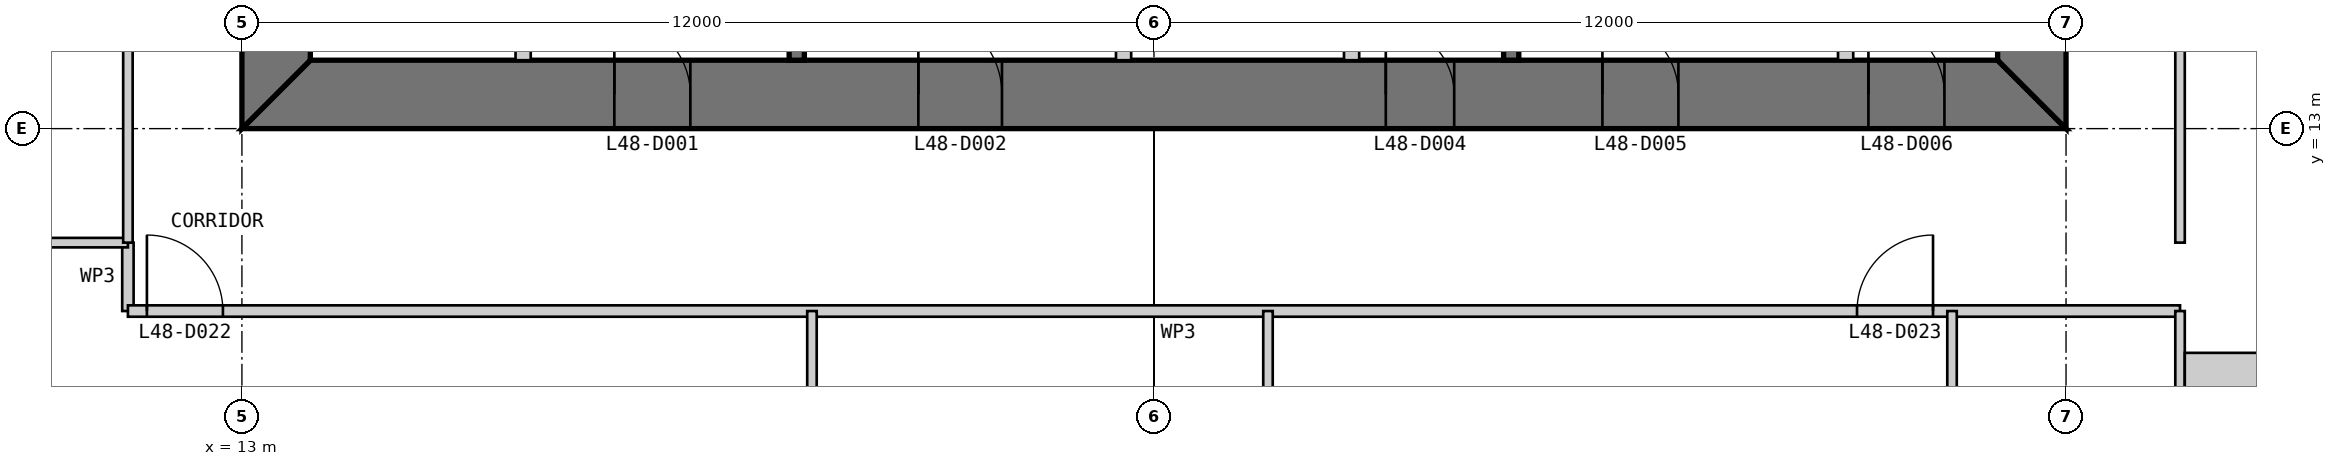
"""IFC4 building model, lengths in metres.
Left out: names, types, materials, properties, quantities, classifications, styles, units other than length and angle.
Written with IfcOpenShell. Run it as: python <this file> out.ifc"""

import sys

from ifc_helpers import new_model, si_unit, direction, frame, frame_2d, origin, place, context, subcontext, project, spatial, polyline, rectangle, outline, extrude, element, fill, save


model = new_model("IFC4")
c1 = context("Model", 3, precision=1e-05, world=origin(), true_north=direction((0.0, 1.0)))
c2 = subcontext(c1, "Body", "Model", "MODEL_VIEW")
j1 = project(units=[si_unit("LENGTHUNIT", "METRE"), si_unit("PLANEANGLEUNIT", "RADIAN")], contexts=[c1])
p1 = place(None, origin())
s1 = spatial("IfcSite", under=j1, at=p1, CompositionType="ELEMENT")
p2 = place(p1, origin())
s2 = spatial("IfcBuilding", under=s1, at=p2, CompositionType="ELEMENT")
p3 = place(p2, frame((0.0, 0.0, 205.8)))
s3 = spatial("IfcBuildingStorey", under=s2, at=p3, CompositionType="ELEMENT", Elevation=205.8)
p4 = place(p3, frame((13.0, 13.45, 0.0), z_axis=(0.0, 0.0, 1.0), x_axis=(1.0, 0.0, 0.0)))
e1 = element("IfcWall", 1, at=p4, inside=s3, PredefinedType="SHEAR", context=c2, shape_type="SweptSolid", body=[
    extrude(outline(polyline([(0.0, -0.45), (24.0, -0.45), (23.1, 0.45), (0.9, 0.45), (0.0, -0.45)])), origin(), (0.0, 0.0, 1.0), 4.0),
])
p5 = place(p4, frame((4.9, 0.0, 0.0)))
e2 = element("IfcOpeningElement", 2, at=p5, cuts=e1, PredefinedType="OPENING", context=c2, shape_type="SweptSolid", body=[
    extrude(rectangle(XDim=1.0, YDim=2.2, at=frame_2d((0.5, 1.1))), frame((0.0, 0.46, 0.0), z_axis=(0.0, -1.0, 0.0), x_axis=(1.0, 0.0, 0.0)), (0.0, 0.0, 1.0), 0.92),
])
p6 = place(p4, frame((8.9, 0.0, 0.0)))
e3 = element("IfcOpeningElement", 3, at=p6, cuts=e1, PredefinedType="OPENING", context=c2, shape_type="SweptSolid", body=[
    extrude(rectangle(XDim=1.1, YDim=2.2, at=frame_2d((0.55, 1.1))), frame((0.0, 0.46, 0.0), z_axis=(0.0, -1.0, 0.0), x_axis=(1.0, 0.0, 0.0)), (0.0, 0.0, 1.0), 0.92),
])
p7 = place(p4, frame((15.05, 0.0, 0.0)))
e4 = element("IfcOpeningElement", 4, at=p7, cuts=e1, PredefinedType="OPENING", context=c2, shape_type="SweptSolid", body=[
    extrude(rectangle(XDim=0.9, YDim=2.2, at=frame_2d((0.45, 1.1))), frame((0.0, 0.46, 0.0), z_axis=(0.0, -1.0, 0.0), x_axis=(1.0, 0.0, 0.0)), (0.0, 0.0, 1.0), 0.92),
])
p8 = place(p4, frame((17.9, 0.0, 0.0)))
e5 = element("IfcOpeningElement", 5, at=p8, cuts=e1, PredefinedType="OPENING", context=c2, shape_type="SweptSolid", body=[
    extrude(rectangle(XDim=1.0, YDim=2.2, at=frame_2d((0.5, 1.1))), frame((0.0, 0.46, 0.0), z_axis=(0.0, -1.0, 0.0), x_axis=(1.0, 0.0, 0.0)), (0.0, 0.0, 1.0), 0.92),
])
p9 = place(p4, frame((21.4, 0.0, 0.0)))
e6 = element("IfcOpeningElement", 6, at=p9, cuts=e1, PredefinedType="OPENING", context=c2, shape_type="SweptSolid", body=[
    extrude(rectangle(XDim=1.0, YDim=2.2, at=frame_2d((0.5, 1.1))), frame((0.0, 0.46, 0.0), z_axis=(0.0, -1.0, 0.0), x_axis=(1.0, 0.0, 0.0)), (0.0, 0.0, 1.0), 0.92),
])
p10 = place(p3, frame((36.55, 13.9, 0.0), z_axis=(0.0, 0.0, 1.0), x_axis=(0.0, 1.0, 0.0)))
e7 = element("IfcWall", 7, at=p10, inside=s3, PredefinedType="SHEAR", context=c2, shape_type="SweptSolid", body=[
    extrude(outline(polyline([(-0.9, -0.45), (23.1, -0.45), (22.2, 0.45), (0.0, 0.45), (-0.9, -0.45)])), origin(), (0.0, 0.0, 1.0), 4.0),
])
p11 = place(p10, frame((20.2, 0.0, 0.0)))
e8 = element("IfcOpeningElement", 8, at=p11, cuts=e7, PredefinedType="OPENING", context=c2, shape_type="SweptSolid", body=[
    extrude(rectangle(XDim=1.0, YDim=2.2, at=frame_2d((0.5, 1.1))), frame((0.0, 0.46, 0.0), z_axis=(0.0, -1.0, 0.0), x_axis=(1.0, 0.0, 0.0)), (0.0, 0.0, 1.0), 0.92),
])
p12 = place(p10, frame((17.25, 0.0, 0.0)))
e9 = element("IfcOpeningElement", 9, at=p12, cuts=e7, PredefinedType="OPENING", context=c2, shape_type="SweptSolid", body=[
    extrude(rectangle(XDim=0.9, YDim=2.2, at=frame_2d((0.45, 1.1))), frame((0.0, 0.46, 0.0), z_axis=(0.0, -1.0, 0.0), x_axis=(1.0, 0.0, 0.0)), (0.0, 0.0, 1.0), 0.92),
])
p13 = place(p3, frame((13.45, 36.1, 0.0), z_axis=(0.0, 0.0, 1.0), x_axis=(0.0, -1.0, 0.0)))
e10 = element("IfcWall", 10, at=p13, inside=s3, PredefinedType="SHEAR", context=c2, shape_type="SweptSolid", body=[
    extrude(outline(polyline([(-0.9, -0.45), (23.1, -0.45), (22.2, 0.45), (0.0, 0.45), (-0.9, -0.45)])), origin(), (0.0, 0.0, 1.0), 4.0),
])
p14 = place(p13, frame((20.2, 0.0, 0.0)))
e11 = element("IfcOpeningElement", 11, at=p14, cuts=e10, PredefinedType="OPENING", context=c2, shape_type="SweptSolid", body=[
    extrude(rectangle(XDim=1.0, YDim=2.2, at=frame_2d((0.5, 1.1))), frame((0.0, 0.46, 0.0), z_axis=(0.0, -1.0, 0.0), x_axis=(1.0, 0.0, 0.0)), (0.0, 0.0, 1.0), 0.92),
])
p15 = place(p13, frame((17.25, 0.0, 0.0)))
e12 = element("IfcOpeningElement", 12, at=p15, cuts=e10, PredefinedType="OPENING", context=c2, shape_type="SweptSolid", body=[
    extrude(rectangle(XDim=0.9, YDim=2.2, at=frame_2d((0.45, 1.1))), frame((0.0, 0.46, 0.0), z_axis=(0.0, -1.0, 0.0), x_axis=(1.0, 0.0, 0.0)), (0.0, 0.0, 1.0), 0.92),
])
p16 = place(p3, frame((16.7, 13.9, 0.0), z_axis=(0.0, 0.0, 1.0), x_axis=(0.0, 1.0, 0.0)))
e13 = element("IfcWall", 13, at=p16, inside=s3, PredefinedType="PARTITIONING", context=c2, shape_type="SweptSolid", body=[
    extrude(rectangle(XDim=16.1, YDim=0.2, at=frame_2d((8.05, 0.0))), origin(), (0.0, 0.0, 1.0), 3.8),
])
p17 = place(p16, frame((7.4, 0.0, 0.0)))
e14 = element("IfcOpeningElement", 14, at=p17, cuts=e13, PredefinedType="OPENING", context=c2, shape_type="SweptSolid", body=[
    extrude(rectangle(XDim=0.9, YDim=2.2, at=frame_2d((0.45, 1.1))), frame((0.0, 0.11, 0.0), z_axis=(0.0, -1.0, 0.0), x_axis=(1.0, 0.0, 0.0)), (0.0, 0.0, 1.0), 0.22),
])
p18 = place(p16, frame((12.4, 0.0, 0.0)))
e15 = element("IfcOpeningElement", 15, at=p18, cuts=e13, PredefinedType="OPENING", context=c2, shape_type="SweptSolid", body=[
    extrude(rectangle(XDim=0.9, YDim=2.2, at=frame_2d((0.45, 1.1))), frame((0.0, 0.11, 0.0), z_axis=(0.0, -1.0, 0.0), x_axis=(1.0, 0.0, 0.0)), (0.0, 0.0, 1.0), 0.22),
])
p19 = place(p3, frame((20.3, 13.9, 0.0), z_axis=(0.0, 0.0, 1.0), x_axis=(0.0, 1.0, 0.0)))
e16 = element("IfcWall", 16, at=p19, inside=s3, PredefinedType="SOLIDWALL", context=c2, shape_type="SweptSolid", body=[
    extrude(rectangle(XDim=16.1, YDim=0.2, at=frame_2d((8.05, 0.0))), origin(), (0.0, 0.0, 1.0), 3.8),
])
p20 = place(p19, frame((7.9, 0.0, 0.0)))
e17 = element("IfcOpeningElement", 17, at=p20, cuts=e16, PredefinedType="OPENING", context=c2, shape_type="SweptSolid", body=[
    extrude(rectangle(XDim=0.9, YDim=2.2, at=frame_2d((0.45, 1.1))), frame((0.0, 0.11, 0.0), z_axis=(0.0, -1.0, 0.0), x_axis=(1.0, 0.0, 0.0)), (0.0, 0.0, 1.0), 0.22),
])
p21 = place(p19, frame((12.9, 0.0, 0.0)))
e18 = element("IfcOpeningElement", 18, at=p21, cuts=e16, PredefinedType="OPENING", context=c2, shape_type="SweptSolid", body=[
    extrude(rectangle(XDim=0.9, YDim=2.2, at=frame_2d((0.45, 1.1))), frame((0.0, 0.11, 0.0), z_axis=(0.0, -1.0, 0.0), x_axis=(1.0, 0.0, 0.0)), (0.0, 0.0, 1.0), 0.22),
])
p22 = place(p3, frame((24.6, 13.9, 0.0), z_axis=(0.0, 0.0, 1.0), x_axis=(0.0, 1.0, 0.0)))
e19 = element("IfcWall", 19, at=p22, inside=s3, PredefinedType="PARTITIONING", context=c2, shape_type="SweptSolid", body=[
    extrude(rectangle(XDim=3.3, YDim=0.2, at=frame_2d((1.65, 0.0))), origin(), (0.0, 0.0, 1.0), 3.8),
])
p23 = place(p22, frame((0.9, 0.0, 0.0)))
e20 = element("IfcOpeningElement", 20, at=p23, cuts=e19, PredefinedType="OPENING", context=c2, shape_type="SweptSolid", body=[
    extrude(rectangle(XDim=1.1, YDim=2.2, at=frame_2d((0.55, 1.1))), frame((0.0, 0.11, 0.0), z_axis=(0.0, -1.0, 0.0), x_axis=(1.0, 0.0, 0.0)), (0.0, 0.0, 1.0), 0.22),
])
p24 = place(p3, frame((27.6, 13.9, 0.0), z_axis=(0.0, 0.0, 1.0), x_axis=(0.0, 1.0, 0.0)))
e21 = element("IfcWall", 21, at=p24, inside=s3, PredefinedType="PARTITIONING", context=c2, shape_type="SweptSolid", body=[
    extrude(rectangle(XDim=3.3, YDim=0.2, at=frame_2d((1.65, 0.0))), origin(), (0.0, 0.0, 1.0), 3.8),
])
p25 = place(p3, frame((29.7, 13.9, 0.0), z_axis=(0.0, 0.0, 1.0), x_axis=(0.0, 1.0, 0.0)))
e22 = element("IfcWall", 22, at=p25, inside=s3, PredefinedType="SOLIDWALL", context=c2, shape_type="SweptSolid", body=[
    extrude(rectangle(XDim=6.1, YDim=0.2, at=frame_2d((3.05, 0.0))), origin(), (0.0, 0.0, 1.0), 3.8),
])
p26 = place(p3, frame((34.1, 13.9, 0.0), z_axis=(0.0, 0.0, 1.0), x_axis=(0.0, 1.0, 0.0)))
e23 = element("IfcWall", 23, at=p26, inside=s3, PredefinedType="PARTITIONING", context=c2, shape_type="SweptSolid", body=[
    extrude(rectangle(XDim=6.1, YDim=0.2, at=frame_2d((3.05, 0.0))), origin(), (0.0, 0.0, 1.0), 3.8),
])
p27 = place(p3, frame((11.5, 11.5, 0.0), z_axis=(0.0, 0.0, 1.0), x_axis=(0.0, -1.0, 0.0)))
e24 = element("IfcWall", 24, at=p27, inside=s3, PredefinedType="PARTITIONING", context=c2, shape_type="SweptSolid", body=[
    extrude(rectangle(XDim=0.9, YDim=0.15, at=frame_2d((0.45, 0.0))), origin(), (0.0, 0.0, 1.0), 3.85),
])
p28 = place(p3, frame((11.5, 10.6, 0.0), z_axis=(0.0, 0.0, 1.0), x_axis=(1.0, 0.0, 0.0)))
e25 = element("IfcWall", 25, at=p28, inside=s3, PredefinedType="PARTITIONING", context=c2, shape_type="SweptSolid", body=[
    extrude(rectangle(XDim=27.0, YDim=0.15, at=frame_2d((13.5, 0.0))), origin(), (0.0, 0.0, 1.0), 3.85),
])
p29 = place(p28, frame((0.25, 0.0, 0.0)))
e26 = element("IfcOpeningElement", 26, at=p29, cuts=e25, PredefinedType="OPENING", context=c2, shape_type="SweptSolid", body=[
    extrude(rectangle(XDim=1.0, YDim=2.2, at=frame_2d((0.5, 1.1))), frame((0.0, 0.085, 0.0), z_axis=(0.0, -1.0, 0.0), x_axis=(1.0, 0.0, 0.0)), (0.0, 0.0, 1.0), 0.17),
])
p30 = place(p28, frame((22.75, 0.0, 0.0)))
e27 = element("IfcOpeningElement", 27, at=p30, cuts=e25, PredefinedType="OPENING", context=c2, shape_type="SweptSolid", body=[
    extrude(rectangle(XDim=1.0, YDim=2.2, at=frame_2d((0.5, 1.1))), frame((0.0, 0.085, 0.0), z_axis=(0.0, -1.0, 0.0), x_axis=(1.0, 0.0, 0.0)), (0.0, 0.0, 1.0), 0.17),
])
p31 = place(p3, frame((0.15, 11.5, 0.0), z_axis=(0.0, 0.0, 1.0), x_axis=(1.0, 0.0, 0.0)))
e28 = element("IfcWall", 28, at=p31, inside=s3, PredefinedType="PARTITIONING", context=c2, shape_type="SweptSolid", body=[
    extrude(rectangle(XDim=11.35, YDim=0.125, at=frame_2d((5.675, 0.0))), origin(), (0.0, 0.0, 1.0), 3.85),
])
p32 = place(p3, frame((20.5, 4.0, 0.0), z_axis=(0.0, 0.0, 1.0), x_axis=(0.0, 1.0, 0.0)))
e29 = element("IfcWall", 29, at=p32, inside=s3, PredefinedType="PARTITIONING", context=c2, shape_type="SweptSolid", body=[
    extrude(rectangle(XDim=6.6, YDim=0.125, at=frame_2d((3.3, 0.0))), origin(), (0.0, 0.0, 1.0), 3.85),
])
p33 = place(p3, frame((26.5, 4.0, 0.0), z_axis=(0.0, 0.0, 1.0), x_axis=(0.0, 1.0, 0.0)))
e30 = element("IfcWall", 30, at=p33, inside=s3, PredefinedType="PARTITIONING", context=c2, shape_type="SweptSolid", body=[
    extrude(rectangle(XDim=6.6, YDim=0.125, at=frame_2d((3.3, 0.0))), origin(), (0.0, 0.0, 1.0), 3.85),
])
p34 = place(p33, frame((2.8, 0.0, 0.0)))
e31 = element("IfcOpeningElement", 31, at=p34, cuts=e30, PredefinedType="OPENING", context=c2, shape_type="SweptSolid", body=[
    extrude(rectangle(XDim=1.0, YDim=2.2, at=frame_2d((0.5, 1.1))), frame((0.0, 0.073, 0.0), z_axis=(0.0, -1.0, 0.0), x_axis=(1.0, 0.0, 0.0)), (0.0, 0.0, 1.0), 0.145),
])
p35 = place(p3, frame((35.5, 4.0, 0.0), z_axis=(0.0, 0.0, 1.0), x_axis=(0.0, 1.0, 0.0)))
e32 = element("IfcWall", 32, at=p35, inside=s3, PredefinedType="PARTITIONING", context=c2, shape_type="SweptSolid", body=[
    extrude(rectangle(XDim=6.6, YDim=0.125, at=frame_2d((3.3, 0.0))), origin(), (0.0, 0.0, 1.0), 3.85),
])
p36 = place(p35, frame((2.85, 0.0, 0.0)))
e33 = element("IfcOpeningElement", 33, at=p36, cuts=e32, PredefinedType="OPENING", context=c2, shape_type="SweptSolid", body=[
    extrude(rectangle(XDim=0.9, YDim=2.2, at=frame_2d((0.45, 1.1))), frame((0.0, 0.073, 0.0), z_axis=(0.0, -1.0, 0.0), x_axis=(1.0, 0.0, 0.0)), (0.0, 0.0, 1.0), 0.145),
])
p37 = place(p3, frame((38.5, 0.15, 0.0), z_axis=(0.0, 0.0, 1.0), x_axis=(0.0, 1.0, 0.0)))
e34 = element("IfcWall", 34, at=p37, inside=s3, PredefinedType="PARTITIONING", context=c2, shape_type="SweptSolid", body=[
    extrude(rectangle(XDim=10.45, YDim=0.125, at=frame_2d((5.225, 0.0))), origin(), (0.0, 0.0, 1.0), 3.85),
])
for number, where, z_axis, x_axis in (
    (35, (38.5, 11.5, 0.0), (0.0, 0.0, 1.0), (0.0, 1.0, 0.0)),
    (36, (11.5, 14.5, 0.0), (0.0, 0.0, 1.0), (0.0, -1.0, 0.0)),
):
    element("IfcWall", number, at=place(p3, frame(where, z_axis=z_axis, x_axis=x_axis)), inside=s3, PredefinedType="PARTITIONING", context=c2, shape_type="SweptSolid", body=[
        extrude(rectangle(XDim=3.0, YDim=0.125, at=frame_2d((1.5, 0.0))), origin(), (0.0, 0.0, 1.0), 3.85),
    ])
p38 = place(p3, frame((38.562, 9.0, 0.0), z_axis=(0.0, 0.0, 1.0), x_axis=(1.0, 0.0, 0.0)))
e37 = element("IfcWall", 37, at=p38, inside=s3, PredefinedType="PARTITIONING", context=c2, shape_type="SweptSolid", body=[
    extrude(rectangle(XDim=1.438, YDim=2.1, at=frame_2d((0.719, 0.0))), origin(), (0.0, 0.0, 1.0), 3.85),
])
p39 = place(p5, origin())
e38 = element("IfcDoor", 38, at=p39, inside=s3, OperationType="SINGLE_SWING_LEFT", PredefinedType="DOOR", context=c2, shape_type="SweptSolid", body=[
    extrude(rectangle(XDim=1.0, YDim=2.2, at=frame_2d((0.5, 1.1))), frame((0.0, 0.025, 0.0), z_axis=(0.0, -1.0, 0.0), x_axis=(1.0, 0.0, 0.0)), (0.0, 0.0, 1.0), 0.05),
    extrude(outline(polyline([(0.0, 0.0), (0.04, 0.0), (0.04, 2.16), (0.96, 2.16), (0.96, 0.0), (1.0, 0.0), (1.0, 2.2), (0.0, 2.2), (0.0, 0.0)])), frame((0.0, 0.3, 0.0), z_axis=(0.0, -1.0, 0.0), x_axis=(1.0, 0.0, 0.0)), (0.0, 0.0, 1.0), 0.6),
])
fill(e2, e38)
p40 = place(p6, origin())
e39 = element("IfcDoor", 39, at=p40, inside=s3, OperationType="SINGLE_SWING_LEFT", PredefinedType="DOOR", context=c2, shape_type="SweptSolid", body=[
    extrude(rectangle(XDim=1.1, YDim=2.2, at=frame_2d((0.55, 1.1))), frame((0.0, 0.025, 0.0), z_axis=(0.0, -1.0, 0.0), x_axis=(1.0, 0.0, 0.0)), (0.0, 0.0, 1.0), 0.05),
    extrude(outline(polyline([(0.0, 0.0), (0.04, 0.0), (0.04, 2.16), (1.06, 2.16), (1.06, 0.0), (1.1, 0.0), (1.1, 2.2), (0.0, 2.2), (0.0, 0.0)])), frame((0.0, 0.3, 0.0), z_axis=(0.0, -1.0, 0.0), x_axis=(1.0, 0.0, 0.0)), (0.0, 0.0, 1.0), 0.6),
])
fill(e3, e39)
p41 = place(p7, origin())
e40 = element("IfcDoor", 40, at=p41, inside=s3, OperationType="SINGLE_SWING_LEFT", PredefinedType="DOOR", context=c2, shape_type="SweptSolid", body=[
    extrude(rectangle(XDim=0.9, YDim=2.2, at=frame_2d((0.45, 1.1))), frame((0.0, 0.025, 0.0), z_axis=(0.0, -1.0, 0.0), x_axis=(1.0, 0.0, 0.0)), (0.0, 0.0, 1.0), 0.05),
    extrude(outline(polyline([(0.0, 0.0), (0.04, 0.0), (0.04, 2.16), (0.86, 2.16), (0.86, 0.0), (0.9, 0.0), (0.9, 2.2), (0.0, 2.2), (0.0, 0.0)])), frame((0.0, 0.3, 0.0), z_axis=(0.0, -1.0, 0.0), x_axis=(1.0, 0.0, 0.0)), (0.0, 0.0, 1.0), 0.6),
])
fill(e4, e40)
p42 = place(p8, origin())
e41 = element("IfcDoor", 41, at=p42, inside=s3, OperationType="SINGLE_SWING_LEFT", PredefinedType="DOOR", context=c2, shape_type="SweptSolid", body=[
    extrude(rectangle(XDim=1.0, YDim=2.2, at=frame_2d((0.5, 1.1))), frame((0.0, 0.025, 0.0), z_axis=(0.0, -1.0, 0.0), x_axis=(1.0, 0.0, 0.0)), (0.0, 0.0, 1.0), 0.05),
    extrude(outline(polyline([(0.0, 0.0), (0.04, 0.0), (0.04, 2.16), (0.96, 2.16), (0.96, 0.0), (1.0, 0.0), (1.0, 2.2), (0.0, 2.2), (0.0, 0.0)])), frame((0.0, 0.3, 0.0), z_axis=(0.0, -1.0, 0.0), x_axis=(1.0, 0.0, 0.0)), (0.0, 0.0, 1.0), 0.6),
])
fill(e5, e41)
p43 = place(p9, origin())
e42 = element("IfcDoor", 42, at=p43, inside=s3, OperationType="SINGLE_SWING_LEFT", PredefinedType="DOOR", context=c2, shape_type="SweptSolid", body=[
    extrude(rectangle(XDim=1.0, YDim=2.2, at=frame_2d((0.5, 1.1))), frame((0.0, 0.025, 0.0), z_axis=(0.0, -1.0, 0.0), x_axis=(1.0, 0.0, 0.0)), (0.0, 0.0, 1.0), 0.05),
    extrude(outline(polyline([(0.0, 0.0), (0.04, 0.0), (0.04, 2.16), (0.96, 2.16), (0.96, 0.0), (1.0, 0.0), (1.0, 2.2), (0.0, 2.2), (0.0, 0.0)])), frame((0.0, 0.3, 0.0), z_axis=(0.0, -1.0, 0.0), x_axis=(1.0, 0.0, 0.0)), (0.0, 0.0, 1.0), 0.6),
])
fill(e6, e42)
p44 = place(p29, origin())
e43 = element("IfcDoor", 43, at=p44, inside=s3, OperationType="SINGLE_SWING_LEFT", PredefinedType="DOOR", context=c2, shape_type="SweptSolid", body=[
    extrude(rectangle(XDim=1.0, YDim=2.2, at=frame_2d((0.5, 1.1))), frame((0.0, 0.025, 0.0), z_axis=(0.0, -1.0, 0.0), x_axis=(1.0, 0.0, 0.0)), (0.0, 0.0, 1.0), 0.05),
])
fill(e26, e43)
p45 = place(p30, origin())
e44 = element("IfcDoor", 44, at=p45, inside=s3, OperationType="SINGLE_SWING_RIGHT", PredefinedType="DOOR", context=c2, shape_type="SweptSolid", body=[
    extrude(rectangle(XDim=1.0, YDim=2.2, at=frame_2d((0.5, 1.1))), frame((0.0, 0.025, 0.0), z_axis=(0.0, -1.0, 0.0), x_axis=(1.0, 0.0, 0.0)), (0.0, 0.0, 1.0), 0.05),
])
fill(e27, e44)
save(model, sys.argv[1])
